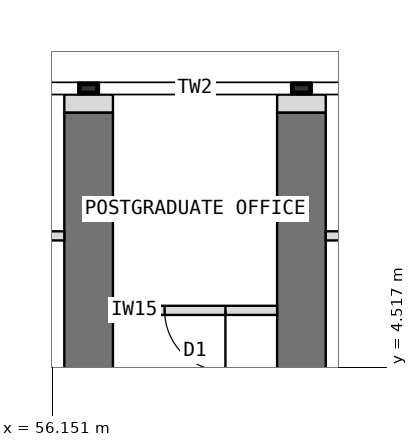
"""IFC4 building model, lengths in metres.
Left out: names, types, materials, properties, quantities, classifications, styles, units other than length and angle.
Written with IfcOpenShell. Run it as: python <this file> out.ifc"""

import sys

from ifc_helpers import new_model, si_unit, direction, frame, frame_2d, origin, place, context, subcontext, project, spatial, rectangle, extrude, element, fill, save


model = new_model("IFC4")
c1 = context("Model", 3, precision=1e-05, world=origin(), true_north=direction((0.0, 1.0)))
c2 = subcontext(c1, "Body", "Model", "MODEL_VIEW")
j1 = project(units=[si_unit("LENGTHUNIT", "METRE"), si_unit("PLANEANGLEUNIT", "RADIAN")], contexts=[c1])
p1 = place(None, origin())
s1 = spatial("IfcSite", under=j1, at=p1, CompositionType="ELEMENT")
p2 = place(p1, origin())
s2 = spatial("IfcBuilding", under=s1, at=p2, CompositionType="ELEMENT")
p3 = place(p2, frame((0.0, 0.0, 133.5)))
s3 = spatial("IfcBuildingStorey", under=s2, at=p3, CompositionType="ELEMENT", Elevation=133.5)
p4 = place(p3, frame((56.75, -4.5, 0.0), z_axis=(0.0, 0.0, 1.0), x_axis=(0.0, 1.0, 0.0)))
e1 = element("IfcWall", 1, at=p4, inside=s3, PredefinedType="SHEAR", context=c2, shape_type="SweptSolid", body=[
    extrude(rectangle(XDim=13.2, YDim=0.8, at=frame_2d((6.6, 0.0))), origin(), (0.0, 0.0, 1.0), 4.0),
])
p5 = place(p4, frame((0.55, 0.0, 0.0)))
e2 = element("IfcOpeningElement", 2, at=p5, cuts=e1, PredefinedType="OPENING", context=c2, shape_type="SweptSolid", body=[
    extrude(rectangle(XDim=0.9, YDim=2.1, at=frame_2d((0.45, 1.05))), frame((0.0, 0.41, 0.0), z_axis=(0.0, -1.0, 0.0), x_axis=(1.0, 0.0, 0.0)), (0.0, 0.0, 1.0), 0.82),
])
p6 = place(p4, frame((2.75, 0.0, 0.0)))
e3 = element("IfcOpeningElement", 3, at=p6, cuts=e1, PredefinedType="OPENING", context=c2, shape_type="SweptSolid", body=[
    extrude(rectangle(XDim=1.0, YDim=2.1, at=frame_2d((0.5, 1.05))), frame((0.0, 0.41, 0.0), z_axis=(0.0, -1.0, 0.0), x_axis=(1.0, 0.0, 0.0)), (0.0, 0.0, 1.0), 0.82),
])
p7 = place(p4, frame((7.25, 0.0, 0.0)))
e4 = element("IfcOpeningElement", 4, at=p7, cuts=e1, PredefinedType="OPENING", context=c2, shape_type="SweptSolid", body=[
    extrude(rectangle(XDim=1.0, YDim=2.1, at=frame_2d((0.5, 1.05))), frame((0.0, 0.41, 0.0), z_axis=(0.0, -1.0, 0.0), x_axis=(1.0, 0.0, 0.0)), (0.0, 0.0, 1.0), 0.82),
])
p8 = place(p3, frame((60.25, -4.5, 0.0), z_axis=(0.0, 0.0, 1.0), x_axis=(0.0, 1.0, 0.0)))
e5 = element("IfcWall", 5, at=p8, inside=s3, PredefinedType="SHEAR", context=c2, shape_type="SweptSolid", body=[
    extrude(rectangle(XDim=13.2, YDim=0.8, at=frame_2d((6.6, 0.0))), origin(), (0.0, 0.0, 1.0), 4.0),
])
p9 = place(p8, frame((0.55, 0.0, 0.0)))
e6 = element("IfcOpeningElement", 6, at=p9, cuts=e5, PredefinedType="OPENING", context=c2, shape_type="SweptSolid", body=[
    extrude(rectangle(XDim=0.9, YDim=2.1, at=frame_2d((0.45, 1.05))), frame((0.0, 0.41, 0.0), z_axis=(0.0, -1.0, 0.0), x_axis=(1.0, 0.0, 0.0)), (0.0, 0.0, 1.0), 0.82),
])
p10 = place(p8, frame((2.75, 0.0, 0.0)))
e7 = element("IfcOpeningElement", 7, at=p10, cuts=e5, PredefinedType="OPENING", context=c2, shape_type="SweptSolid", body=[
    extrude(rectangle(XDim=1.0, YDim=2.1, at=frame_2d((0.5, 1.05))), frame((0.0, 0.41, 0.0), z_axis=(0.0, -1.0, 0.0), x_axis=(1.0, 0.0, 0.0)), (0.0, 0.0, 1.0), 0.82),
])
p11 = place(p8, frame((7.25, 0.0, 0.0)))
e8 = element("IfcOpeningElement", 8, at=p11, cuts=e5, PredefinedType="OPENING", context=c2, shape_type="SweptSolid", body=[
    extrude(rectangle(XDim=1.0, YDim=2.1, at=frame_2d((0.5, 1.05))), frame((0.0, 0.41, 0.0), z_axis=(0.0, -1.0, 0.0), x_axis=(1.0, 0.0, 0.0)), (0.0, 0.0, 1.0), 0.82),
])
for number, where, z_axis, x_axis in (
    (9, (56.75, 8.7, 0.0), (0.0, 0.0, 1.0), (0.0, 1.0, 0.0)),
    (10, (60.25, 8.7, 0.0), (0.0, 0.0, 1.0), (0.0, 1.0, 0.0)),
):
    element("IfcWall", number, at=place(p3, frame(where, z_axis=z_axis, x_axis=x_axis)), inside=s3, PredefinedType="PARTITIONING", context=c2, shape_type="SweptSolid", body=[
        extrude(rectangle(XDim=0.3, YDim=0.8, at=frame_2d((0.15, 0.0))), origin(), (0.0, 0.0, 1.0), 3.8),
    ])
for number, where, z_axis, x_axis in (
    (11, (56.35, 6.675, 0.0), (0.0, 0.0, 1.0), (-1.0, 0.0, 0.0)),
    (12, (60.65, 6.675, 0.0), (0.0, 0.0, 1.0), (1.0, 0.0, 0.0)),
):
    element("IfcWall", number, at=place(p3, frame(where, z_axis=z_axis, x_axis=x_axis)), inside=s3, PredefinedType="PARTITIONING", context=c2, shape_type="SweptSolid", body=[
        extrude(rectangle(XDim=3.4, YDim=0.15, at=frame_2d((1.7, 0.0))), origin(), (0.0, 0.0, 1.0), 3.8),
    ])
p12 = place(p3, frame((59.85, 5.45, 0.0), z_axis=(0.0, 0.0, 1.0), x_axis=(-1.0, 0.0, 0.0)))
e13 = element("IfcWall", 13, at=p12, inside=s3, PredefinedType="PARTITIONING", context=c2, shape_type="SweptSolid", body=[
    extrude(rectangle(XDim=2.7, YDim=0.15, at=frame_2d((1.35, 0.0))), origin(), (0.0, 0.0, 1.0), 3.8),
])
p13 = place(p12, frame((0.85, 0.0, 0.0)))
e14 = element("IfcOpeningElement", 14, at=p13, cuts=e13, PredefinedType="OPENING", context=c2, shape_type="SweptSolid", body=[
    extrude(rectangle(XDim=1.0, YDim=2.1, at=frame_2d((0.5, 1.05))), frame((0.0, 0.085, 0.0), z_axis=(0.0, -1.0, 0.0), x_axis=(1.0, 0.0, 0.0)), (0.0, 0.0, 1.0), 0.17),
])
p14 = place(p13, origin())
e15 = element("IfcDoor", 15, at=p14, inside=s3, OperationType="SINGLE_SWING_LEFT", PredefinedType="DOOR", context=c2, shape_type="SweptSolid", body=[
    extrude(rectangle(XDim=1.0, YDim=2.1, at=frame_2d((0.5, 1.05))), frame((0.0, 0.025, 0.0), z_axis=(0.0, -1.0, 0.0), x_axis=(1.0, 0.0, 0.0)), (0.0, 0.0, 1.0), 0.05),
])
fill(e14, e15)
save(model, sys.argv[1])
